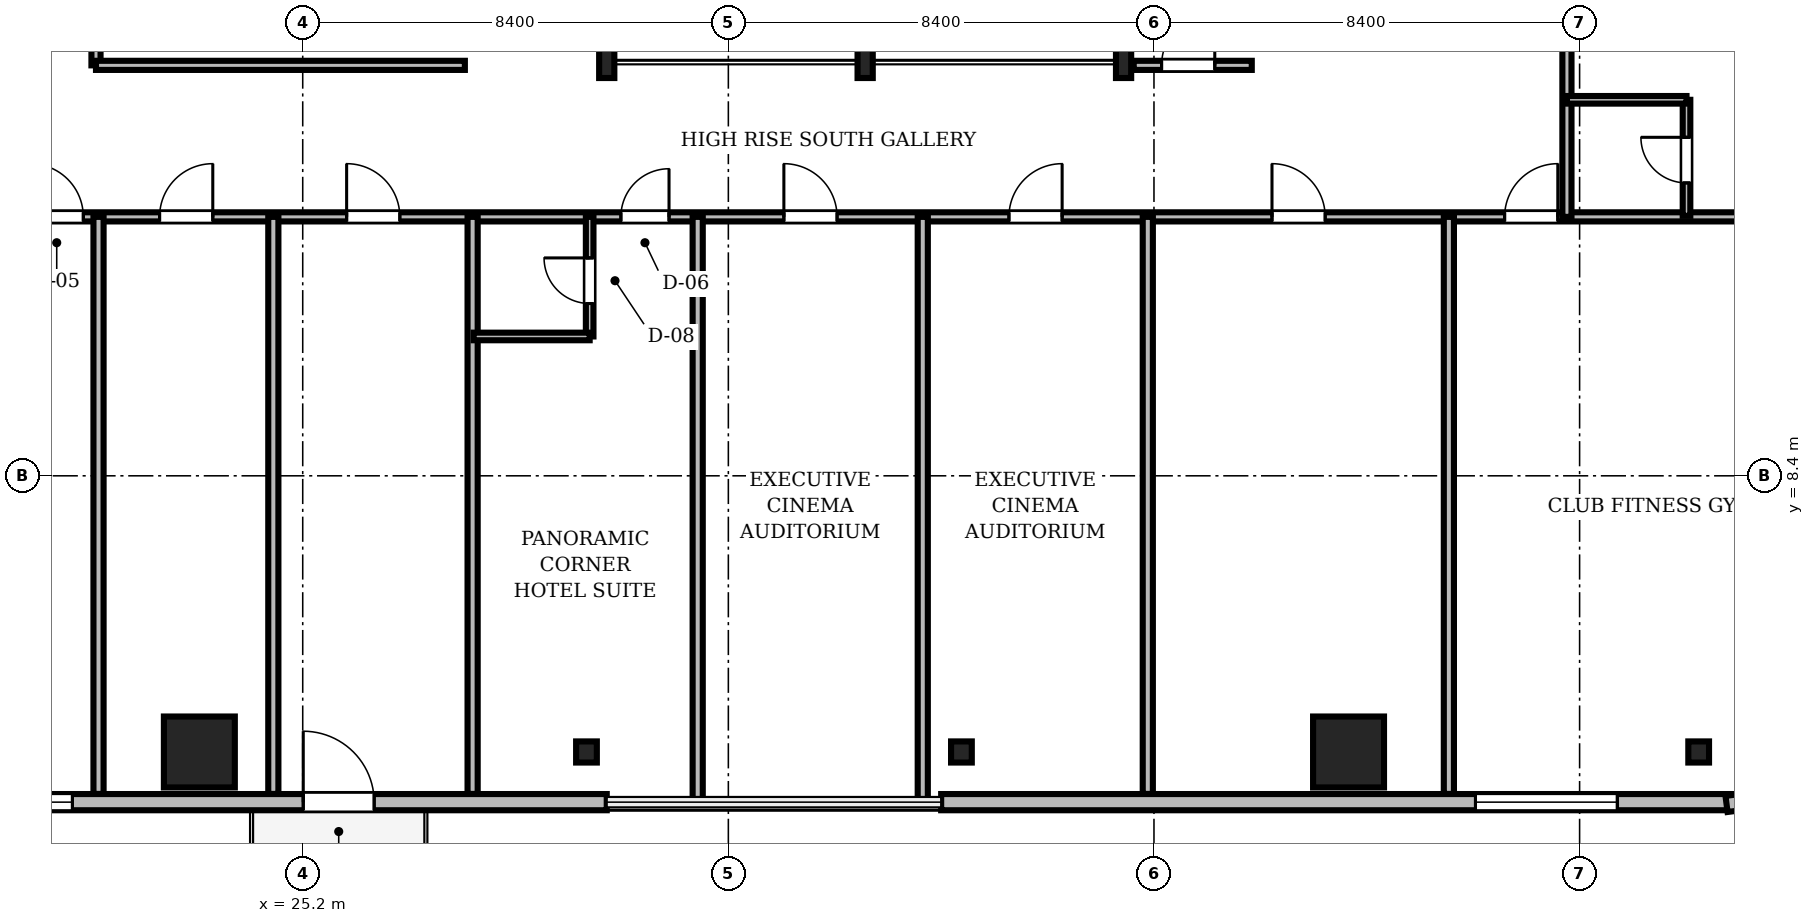
"""IFC4 building model, lengths in metres.
Left out: names, types, materials, properties, quantities, classifications, styles, units other than length and angle.
Written with IfcOpenShell. Run it as: python <this file> out.ifc"""

import sys

from ifc_helpers import new_model, si_unit, direction, frame, frame_2d, origin, origin_2d, place, context, subcontext, project, spatial, rectangle, i_section, extrude, source, transform, mapped, element, fill, save


model = new_model("IFC4")
c1 = context("Model", 3, precision=1e-05, world=origin(), true_north=direction((0.0, 1.0)))
c2 = subcontext(c1, "Body", "Model", "MODEL_VIEW")
j1 = project(units=[si_unit("LENGTHUNIT", "METRE"), si_unit("PLANEANGLEUNIT", "RADIAN")], contexts=[c1])
p1 = place(None, origin())
s1 = spatial("IfcSite", under=j1, at=p1, CompositionType="ELEMENT")
p2 = place(p1, origin())
s2 = spatial("IfcBuilding", under=s1, at=p2, CompositionType="ELEMENT")
p3 = place(p2, frame((0.0, 0.0, 211.05)))
s3 = spatial("IfcBuildingStorey", under=s2, at=p3, CompositionType="ELEMENT", Elevation=211.05)
m1 = source(origin(), c2, "Body", "SweptSolid", [
    extrude(i_section(OverallWidth=0.3, OverallDepth=0.7, WebThickness=0.017, FlangeThickness=0.032, FilletRadius=0.027, at=origin_2d()), origin(), (0.0, 0.0, 1.0), 3.53),
])
for number, where, z_axis, x_axis in (
    (1, (31.2, 16.6, 0.0), (0.0, 0.0, 1.0), (1.0, 0.0, 0.0)),
    (2, (36.3, 16.6, 0.0), (0.0, 0.0, 1.0), (1.0, 0.0, 0.0)),
    (3, (41.4, 16.6, 0.0), (0.0, 0.0, 1.0), (1.0, 0.0, 0.0)),
):
    element("IfcColumn", number, at=place(p3, frame(where, z_axis=z_axis, x_axis=x_axis)), inside=s3, PredefinedType="COLUMN", context=c2, shape_type="MappedRepresentation", body=[
        mapped(m1, transform((0.0, 0.0, 0.0), scale=1.0)),
    ])
m2 = source(origin(), c2, "Body", "SweptSolid", [
    extrude(rectangle(XDim=1.4, YDim=1.4, at=origin_2d()), origin(), (0.0, 0.0, 1.0), 3.53),
])
for number, where, z_axis, x_axis in (
    (4, (23.16, 2.95, 0.0), (0.0, 0.0, 1.0), (1.0, 0.0, 0.0)),
    (5, (45.84, 2.95, 0.0), (0.0, 0.0, 1.0), (1.0, 0.0, 0.0)),
):
    element("IfcColumn", number, at=place(p3, frame(where, z_axis=z_axis, x_axis=x_axis)), inside=s3, PredefinedType="COLUMN", context=c2, shape_type="MappedRepresentation", body=[
        mapped(m2, transform((0.0, 0.0, 0.0), scale=1.0)),
    ])
m3 = source(origin(), c2, "Body", "SweptSolid", [
    extrude(i_section(OverallWidth=0.409, OverallDepth=0.417, WebThickness=0.021, FlangeThickness=0.033, FilletRadius=0.015, at=origin_2d()), origin(), (0.0, 0.0, 1.0), 3.53),
])
for number, where, z_axis, x_axis in (
    (6, (30.8, 2.95, 0.0), (0.0, 0.0, 1.0), (1.0, 0.0, 0.0)),
    (7, (38.2, 2.95, 0.0), (0.0, 0.0, 1.0), (1.0, 0.0, 0.0)),
    (8, (52.75, 2.95, 0.0), (0.0, 0.0, 1.0), (1.0, 0.0, 0.0)),
):
    element("IfcColumn", number, at=place(p3, frame(where, z_axis=z_axis, x_axis=x_axis)), inside=s3, PredefinedType="COLUMN", context=c2, shape_type="MappedRepresentation", body=[
        mapped(m3, transform((0.0, 0.0, 0.0), scale=1.0)),
    ])
m4 = source(origin(), c2, "Body", "SweptSolid", [
    extrude(rectangle(XDim=15.6, YDim=0.32, at=frame_2d((7.8, 0.0))), origin(), (0.0, 0.0, 1.0), 3.53),
])
p4 = place(p3, frame((15.6, 1.96, 0.0), z_axis=(0.0, 0.0, 1.0), x_axis=(1.0, 0.0, 0.0)))
e9 = element("IfcWall", 9, at=p4, inside=s3, PredefinedType="SOLIDWALL", context=c2, shape_type="MappedRepresentation", body=[
    mapped(m4, transform((0.0, 0.0, 0.0), scale=1.0)),
])
m5 = source(origin(), c2, "Body", "SweptSolid", [
    extrude(rectangle(XDim=1.4, YDim=2.3, at=frame_2d((0.7, 1.15))), frame((0.0, 0.17, 0.0), z_axis=(0.0, -1.0, 0.0), x_axis=(1.0, 0.0, 0.0)), (0.0, 0.0, 1.0), 0.34),
])
p5 = place(p4, frame((9.61, 0.0, 0.0)))
e10 = element("IfcOpeningElement", 10, at=p5, cuts=e9, PredefinedType="OPENING", context=c2, shape_type="MappedRepresentation", body=[
    mapped(m5, transform((0.0, 0.0, 0.0), scale=1.0)),
])
m6 = source(origin(), c2, "Body", "SweptSolid", [
    extrude(rectangle(XDim=2.8, YDim=2.4, at=frame_2d((1.4, 1.2))), frame((0.0, 0.17, 0.0), z_axis=(0.0, -1.0, 0.0), x_axis=(1.0, 0.0, 0.0)), (0.0, 0.0, 1.0), 0.34),
])
p6 = place(p4, frame((2.255, 0.0, 0.72)))
e11 = element("IfcOpeningElement", 11, at=p6, cuts=e9, PredefinedType="OPENING", context=c2, shape_type="MappedRepresentation", body=[
    mapped(m6, transform((0.0, 0.0, 0.0), scale=1.0)),
])
p7 = place(p3, frame((37.8, 1.96, 0.0), z_axis=(0.0, 0.0, 1.0), x_axis=(1.0, 0.0, 0.0)))
e12 = element("IfcWall", 12, at=p7, inside=s3, PredefinedType="SOLIDWALL", context=c2, shape_type="MappedRepresentation", body=[
    mapped(m4, transform((0.0, 0.0, 0.0), scale=1.0)),
])
p8 = place(p7, frame((10.545, 0.0, 0.72)))
e13 = element("IfcOpeningElement", 13, at=p8, cuts=e12, PredefinedType="OPENING", context=c2, shape_type="MappedRepresentation", body=[
    mapped(m6, transform((0.0, 0.0, 0.0), scale=1.0)),
])
m7 = source(origin(), c2, "Body", "SweptSolid", [
    extrude(rectangle(XDim=1.17, YDim=0.32, at=frame_2d((0.585, 0.0))), origin(), (0.0, 0.0, 1.0), 3.53),
])
p9 = place(p3, frame((53.3, 1.925, 0.0), z_axis=(0.0, 0.0, 1.0), x_axis=(0.991762485493, 0.128090485085, 0.0)))
e14 = element("IfcWall", 14, at=p9, inside=s3, PredefinedType="SOLIDWALL", context=c2, shape_type="MappedRepresentation", body=[
    mapped(m7, transform((0.0, 0.0, 0.0), scale=1.0)),
])
m8 = source(origin(), c2, "Body", "SweptSolid", [
    extrude(rectangle(XDim=46.156, YDim=0.18, at=frame_2d((23.078, 0.0))), origin(), (0.0, 0.0, 1.0), 2.772),
])
p10 = place(p3, frame((11.422, 13.51, 0.0), z_axis=(0.0, 0.0, 1.0), x_axis=(1.0, 0.0, 0.0)))
e15 = element("IfcWall", 15, at=p10, inside=s3, PredefinedType="PARTITIONING", context=c2, shape_type="MappedRepresentation", body=[
    mapped(m8, transform((0.0, 0.0, 0.0), scale=1.0)),
])
m9 = source(origin(), c2, "Body", "SweptSolid", [
    extrude(rectangle(XDim=1.05, YDim=2.2, at=frame_2d((0.525, 1.1))), frame((0.0, 0.1, 0.0), z_axis=(0.0, -1.0, 0.0), x_axis=(1.0, 0.0, 0.0)), (0.0, 0.0, 1.0), 0.2),
])
p11 = place(p10, frame((8.398, 0.0, 0.0)))
e16 = element("IfcOpeningElement", 16, at=p11, cuts=e15, PredefinedType="OPENING", context=c2, shape_type="MappedRepresentation", body=[
    mapped(m9, transform((0.0, 0.0, 0.0), scale=1.0)),
])
p12 = place(p10, frame((10.953, 0.0, 0.0)))
e17 = element("IfcOpeningElement", 17, at=p12, cuts=e15, PredefinedType="OPENING", context=c2, shape_type="MappedRepresentation", body=[
    mapped(m9, transform((0.0, 0.0, 0.0), scale=1.0)),
])
p13 = place(p10, frame((14.645, 0.0, 0.0)))
e18 = element("IfcOpeningElement", 18, at=p13, cuts=e15, PredefinedType="OPENING", context=c2, shape_type="MappedRepresentation", body=[
    mapped(m9, transform((0.0, 0.0, 0.0), scale=1.0)),
])
m10 = source(origin(), c2, "Body", "SweptSolid", [
    extrude(rectangle(XDim=0.95, YDim=2.15, at=frame_2d((0.475, 1.075))), frame((0.0, 0.1, 0.0), z_axis=(0.0, -1.0, 0.0), x_axis=(1.0, 0.0, 0.0)), (0.0, 0.0, 1.0), 0.2),
])
p14 = place(p10, frame((20.057, 0.0, 0.0)))
e19 = element("IfcOpeningElement", 19, at=p14, cuts=e15, PredefinedType="OPENING", context=c2, shape_type="MappedRepresentation", body=[
    mapped(m10, transform((0.0, 0.0, 0.0), scale=1.0)),
])
p15 = place(p10, frame((23.274, 0.0, 0.0)))
e20 = element("IfcOpeningElement", 20, at=p15, cuts=e15, PredefinedType="OPENING", context=c2, shape_type="MappedRepresentation", body=[
    mapped(m9, transform((0.0, 0.0, 0.0), scale=1.0)),
])
p16 = place(p10, frame((27.716, 0.0, 0.0)))
e21 = element("IfcOpeningElement", 21, at=p16, cuts=e15, PredefinedType="OPENING", context=c2, shape_type="MappedRepresentation", body=[
    mapped(m9, transform((0.0, 0.0, 0.0), scale=1.0)),
])
p17 = place(p10, frame((32.907, 0.0, 0.0)))
e22 = element("IfcOpeningElement", 22, at=p17, cuts=e15, PredefinedType="OPENING", context=c2, shape_type="MappedRepresentation", body=[
    mapped(m9, transform((0.0, 0.0, 0.0), scale=1.0)),
])
p18 = place(p10, frame((37.498, 0.0, 0.0)))
e23 = element("IfcOpeningElement", 23, at=p18, cuts=e15, PredefinedType="OPENING", context=c2, shape_type="MappedRepresentation", body=[
    mapped(m9, transform((0.0, 0.0, 0.0), scale=1.0)),
])
m11 = source(origin(), c2, "Body", "SweptSolid", [
    extrude(rectangle(XDim=27.59, YDim=0.18, at=frame_2d((13.795, 0.0))), origin(), (0.0, 0.0, 1.0), 2.972),
])
p19 = place(p3, frame((50.15, 13.51, 0.0), z_axis=(0.0, 0.0, 1.0), x_axis=(0.0, 1.0, 0.0)))
e24 = element("IfcWall", 24, at=p19, inside=s3, PredefinedType="PARTITIONING", context=c2, shape_type="MappedRepresentation", body=[
    mapped(m11, transform((0.0, 0.0, 0.0), scale=1.0)),
])
p20 = place(p19, frame((4.086, 0.0, 0.0)))
e25 = element("IfcOpeningElement", 25, at=p20, cuts=e24, PredefinedType="OPENING", context=c2, shape_type="MappedRepresentation", body=[
    mapped(m9, transform((0.0, 0.0, 0.0), scale=1.0)),
])
p21 = place(p19, frame((9.744, 0.0, 0.0)))
e26 = element("IfcOpeningElement", 26, at=p21, cuts=e24, PredefinedType="OPENING", context=c2, shape_type="MappedRepresentation", body=[
    mapped(m9, transform((0.0, 0.0, 0.0), scale=1.0)),
])
p22 = place(p19, frame((17.771, 0.0, 0.0)))
e27 = element("IfcOpeningElement", 27, at=p22, cuts=e24, PredefinedType="OPENING", context=c2, shape_type="MappedRepresentation", body=[
    mapped(m9, transform((0.0, 0.0, 0.0), scale=1.0)),
])
p23 = place(p19, frame((24.614, 0.0, 0.0)))
e28 = element("IfcOpeningElement", 28, at=p23, cuts=e24, PredefinedType="OPENING", context=c2, shape_type="MappedRepresentation", body=[
    mapped(m9, transform((0.0, 0.0, 0.0), scale=1.0)),
])
m12 = source(origin(), c2, "Body", "SweptSolid", [
    extrude(rectangle(XDim=11.94, YDim=0.18, at=frame_2d((5.97, 0.0))), origin(), (0.0, 0.0, 1.0), 2.972),
])
p24 = place(p3, frame((21.12, 16.5, 0.0), z_axis=(0.0, 0.0, 1.0), x_axis=(0.0, 1.0, 0.0)))
e29 = element("IfcWall", 29, at=p24, inside=s3, PredefinedType="PARTITIONING", context=c2, shape_type="MappedRepresentation", body=[
    mapped(m12, transform((0.0, 0.0, 0.0), scale=1.0)),
])
p25 = place(p24, frame((4.5, 0.0, 0.0)))
e30 = element("IfcOpeningElement", 30, at=p25, cuts=e29, PredefinedType="OPENING", context=c2, shape_type="MappedRepresentation", body=[
    mapped(m9, transform((0.0, 0.0, 0.0), scale=1.0)),
])
m13 = source(origin(), c2, "Body", "SweptSolid", [
    extrude(rectangle(XDim=2.36, YDim=0.15, at=frame_2d((1.18, 0.0))), origin(), (0.0, 0.0, 1.0), 2.972),
])
p26 = place(p3, frame((30.863, 11.15, 0.0), z_axis=(0.0, 0.0, 1.0), x_axis=(0.0, 1.0, 0.0)))
e31 = element("IfcWall", 31, at=p26, inside=s3, PredefinedType="PARTITIONING", context=c2, shape_type="MappedRepresentation", body=[
    mapped(m13, transform((0.0, 0.0, 0.0), scale=1.0)),
])
m14 = source(origin(), c2, "Body", "SweptSolid", [
    extrude(rectangle(XDim=0.9, YDim=2.1, at=frame_2d((0.45, 1.05))), frame((0.0, 0.085, 0.0), z_axis=(0.0, -1.0, 0.0), x_axis=(1.0, 0.0, 0.0)), (0.0, 0.0, 1.0), 0.17),
])
p27 = place(p26, frame((0.65, 0.0, 0.0)))
e32 = element("IfcOpeningElement", 32, at=p27, cuts=e31, PredefinedType="OPENING", context=c2, shape_type="MappedRepresentation", body=[
    mapped(m14, transform((0.0, 0.0, 0.0), scale=1.0)),
])
m15 = source(origin(), c2, "Body", "SweptSolid", [
    extrude(rectangle(XDim=2.33, YDim=0.18, at=frame_2d((1.165, 0.0))), origin(), (0.0, 0.0, 1.0), 2.972),
])
p28 = place(p3, frame((41.6, 16.5, 0.0), z_axis=(0.0, 0.0, 1.0), x_axis=(1.0, 0.0, 0.0)))
e33 = element("IfcWall", 33, at=p28, inside=s3, PredefinedType="PARTITIONING", context=c2, shape_type="MappedRepresentation", body=[
    mapped(m15, transform((0.0, 0.0, 0.0), scale=1.0)),
])
p29 = place(p28, frame((0.55, 0.0, 0.0)))
e34 = element("IfcOpeningElement", 34, at=p29, cuts=e33, PredefinedType="OPENING", context=c2, shape_type="MappedRepresentation", body=[
    mapped(m9, transform((0.0, 0.0, 0.0), scale=1.0)),
])
m16 = source(origin(), c2, "Body", "SweptSolid", [
    extrude(rectangle(XDim=2.29, YDim=0.15, at=frame_2d((1.145, 0.0))), origin(), (0.0, 0.0, 1.0), 2.972),
])
p30 = place(p3, frame((52.51, 13.53, 0.0), z_axis=(0.0, 0.0, 1.0), x_axis=(0.0, 1.0, 0.0)))
e35 = element("IfcWall", 35, at=p30, inside=s3, PredefinedType="PARTITIONING", context=c2, shape_type="MappedRepresentation", body=[
    mapped(m16, transform((0.0, 0.0, 0.0), scale=1.0)),
])
p31 = place(p30, frame((0.65, 0.0, 0.0)))
e36 = element("IfcOpeningElement", 36, at=p31, cuts=e35, PredefinedType="OPENING", context=c2, shape_type="MappedRepresentation", body=[
    mapped(m14, transform((0.0, 0.0, 0.0), scale=1.0)),
])
m17 = source(origin(), c2, "Body", "SweptSolid", [
    extrude(rectangle(XDim=11.388, YDim=0.2, at=frame_2d((5.694, 0.0))), origin(), (0.0, 0.0, 1.0), 2.772),
])
for number, where, z_axis, x_axis in (
    (37, (21.17, 2.122, 0.0), (0.0, 0.0, 1.0), (0.0, 1.0, 0.0)),
    (38, (24.62, 2.122, 0.0), (0.0, 0.0, 1.0), (0.0, 1.0, 0.0)),
    (39, (28.553, 2.122, 0.0), (0.0, 0.0, 1.0), (0.0, 1.0, 0.0)),
):
    element("IfcWall", number, at=place(p3, frame(where, z_axis=z_axis, x_axis=x_axis)), inside=s3, PredefinedType="PARTITIONING", context=c2, shape_type="MappedRepresentation", body=[
        mapped(m17, transform((0.0, 0.0, 0.0), scale=1.0)),
    ])
m18 = source(origin(), c2, "Body", "SweptSolid", [
    extrude(rectangle(XDim=11.58, YDim=0.2, at=frame_2d((5.79, 0.0))), origin(), (0.0, 0.0, 1.0), 2.772),
])
for number, where, z_axis, x_axis in (
    (40, (32.995, 1.93, 0.0), (0.0, 0.0, 1.0), (0.0, 1.0, 0.0)),
    (41, (37.437, 1.93, 0.0), (0.0, 0.0, 1.0), (0.0, 1.0, 0.0)),
):
    element("IfcWall", number, at=place(p3, frame(where, z_axis=z_axis, x_axis=x_axis)), inside=s3, PredefinedType="PARTITIONING", context=c2, shape_type="MappedRepresentation", body=[
        mapped(m18, transform((0.0, 0.0, 0.0), scale=1.0)),
    ])
for number, where, z_axis, x_axis in (
    (42, (41.878, 2.122, 0.0), (0.0, 0.0, 1.0), (0.0, 1.0, 0.0)),
    (43, (47.82, 2.122, 0.0), (0.0, 0.0, 1.0), (0.0, 1.0, 0.0)),
):
    element("IfcWall", number, at=place(p3, frame(where, z_axis=z_axis, x_axis=x_axis)), inside=s3, PredefinedType="PARTITIONING", context=c2, shape_type="MappedRepresentation", body=[
        mapped(m17, transform((0.0, 0.0, 0.0), scale=1.0)),
    ])
m19 = source(origin(), c2, "Body", "SweptSolid", [
    extrude(rectangle(XDim=7.28, YDim=0.18, at=frame_2d((3.64, 0.0))), origin(), (0.0, 0.0, 1.0), 3.53),
])
p32 = place(p3, frame((21.12, 16.5, 0.0), z_axis=(0.0, 0.0, 1.0), x_axis=(1.0, 0.0, 0.0)))
e44 = element("IfcWall", 44, at=p32, inside=s3, PredefinedType="PARTITIONING", context=c2, shape_type="MappedRepresentation", body=[
    mapped(m19, transform((0.0, 0.0, 0.0), scale=1.0)),
])
m20 = source(origin(), c2, "Body", "SweptSolid", [
    extrude(rectangle(XDim=2.36, YDim=0.15, at=frame_2d((1.18, 0.0))), origin(), (0.0, 0.0, 1.0), 3.53),
])
p33 = place(p3, frame((50.15, 15.82, 0.0), z_axis=(0.0, 0.0, 1.0), x_axis=(1.0, 0.0, 0.0)))
e45 = element("IfcWall", 45, at=p33, inside=s3, PredefinedType="PARTITIONING", context=c2, shape_type="MappedRepresentation", body=[
    mapped(m20, transform((0.0, 0.0, 0.0), scale=1.0)),
])
m21 = source(origin(), c2, "Body", "SweptSolid", [
    extrude(rectangle(XDim=2.29, YDim=0.15, at=frame_2d((1.145, 0.0))), origin(), (0.0, 0.0, 1.0), 3.53),
])
p34 = place(p3, frame((28.573, 11.15, 0.0), z_axis=(0.0, 0.0, 1.0), x_axis=(1.0, 0.0, 0.0)))
e46 = element("IfcWall", 46, at=p34, inside=s3, PredefinedType="PARTITIONING", context=c2, shape_type="MappedRepresentation", body=[
    mapped(m21, transform((0.0, 0.0, 0.0), scale=1.0)),
])
m22 = source(origin(), c2, "Body", "SweptSolid", [
    extrude(rectangle(XDim=1.4, YDim=2.3, at=frame_2d((0.7, 1.15))), frame((0.0, 0.025, 0.0), z_axis=(0.0, -1.0, 0.0), x_axis=(1.0, 0.0, 0.0)), (0.0, 0.0, 1.0), 0.05),
])
p35 = place(p5, frame((1.4, 0.0, 0.0), z_axis=(0.0, 0.0, 1.0), x_axis=(-1.0, 0.0, 0.0)))
e47 = element("IfcDoor", 47, at=p35, inside=s3, OperationType="DOUBLE_DOOR_SLIDING", PredefinedType="DOOR", context=c2, shape_type="MappedRepresentation", body=[
    mapped(m22, transform((0.0, 0.0, 0.0), scale=1.0)),
])
fill(e10, e47)
m23 = source(origin(), c2, "Body", "SweptSolid", [
    extrude(rectangle(XDim=2.8, YDim=2.4, at=frame_2d((1.4, 1.2))), frame((0.0, 0.03, 0.0), z_axis=(0.0, -1.0, 0.0), x_axis=(1.0, 0.0, 0.0)), (0.0, 0.0, 1.0), 0.06),
])
p36 = place(p6, origin())
e48 = element("IfcWindow", 48, at=p36, inside=s3, PartitioningType="SINGLE_PANEL", PredefinedType="WINDOW", context=c2, shape_type="MappedRepresentation", body=[
    mapped(m23, transform((0.0, 0.0, 0.0), scale=1.0)),
])
fill(e11, e48)
p37 = place(p8, origin())
e49 = element("IfcWindow", 49, at=p37, inside=s3, PartitioningType="SINGLE_PANEL", PredefinedType="WINDOW", context=c2, shape_type="MappedRepresentation", body=[
    mapped(m23, transform((0.0, 0.0, 0.0), scale=1.0)),
])
fill(e13, e49)
m24 = source(origin(), c2, "Body", "SweptSolid", [
    extrude(rectangle(XDim=1.05, YDim=2.2, at=frame_2d((0.525, 1.1))), frame((0.0, 0.025, 0.0), z_axis=(0.0, -1.0, 0.0), x_axis=(1.0, 0.0, 0.0)), (0.0, 0.0, 1.0), 0.05),
])
p38 = place(p11, origin())
e50 = element("IfcDoor", 50, at=p38, inside=s3, OperationType="SINGLE_SWING_LEFT", PredefinedType="DOOR", context=c2, shape_type="MappedRepresentation", body=[
    mapped(m24, transform((0.0, 0.0, 0.0), scale=1.0)),
])
fill(e16, e50)
p39 = place(p12, origin())
e51 = element("IfcDoor", 51, at=p39, inside=s3, OperationType="SINGLE_SWING_RIGHT", PredefinedType="DOOR", context=c2, shape_type="MappedRepresentation", body=[
    mapped(m24, transform((0.0, 0.0, 0.0), scale=1.0)),
])
fill(e17, e51)
p40 = place(p13, origin())
e52 = element("IfcDoor", 52, at=p40, inside=s3, OperationType="SINGLE_SWING_LEFT", PredefinedType="DOOR", context=c2, shape_type="MappedRepresentation", body=[
    mapped(m24, transform((0.0, 0.0, 0.0), scale=1.0)),
])
fill(e18, e52)
m25 = source(origin(), c2, "Body", "SweptSolid", [
    extrude(rectangle(XDim=0.95, YDim=2.15, at=frame_2d((0.475, 1.075))), frame((0.0, 0.025, 0.0), z_axis=(0.0, -1.0, 0.0), x_axis=(1.0, 0.0, 0.0)), (0.0, 0.0, 1.0), 0.05),
])
p41 = place(p14, origin())
e53 = element("IfcDoor", 53, at=p41, inside=s3, OperationType="SINGLE_SWING_RIGHT", PredefinedType="DOOR", context=c2, shape_type="MappedRepresentation", body=[
    mapped(m25, transform((0.0, 0.0, 0.0), scale=1.0)),
])
fill(e19, e53)
p42 = place(p15, origin())
e54 = element("IfcDoor", 54, at=p42, inside=s3, OperationType="SINGLE_SWING_LEFT", PredefinedType="DOOR", context=c2, shape_type="MappedRepresentation", body=[
    mapped(m24, transform((0.0, 0.0, 0.0), scale=1.0)),
])
fill(e20, e54)
p43 = place(p16, origin())
e55 = element("IfcDoor", 55, at=p43, inside=s3, OperationType="SINGLE_SWING_RIGHT", PredefinedType="DOOR", context=c2, shape_type="MappedRepresentation", body=[
    mapped(m24, transform((0.0, 0.0, 0.0), scale=1.0)),
])
fill(e21, e55)
p44 = place(p17, origin())
e56 = element("IfcDoor", 56, at=p44, inside=s3, OperationType="SINGLE_SWING_LEFT", PredefinedType="DOOR", context=c2, shape_type="MappedRepresentation", body=[
    mapped(m24, transform((0.0, 0.0, 0.0), scale=1.0)),
])
fill(e22, e56)
p45 = place(p18, origin())
e57 = element("IfcDoor", 57, at=p45, inside=s3, OperationType="SINGLE_SWING_RIGHT", PredefinedType="DOOR", context=c2, shape_type="MappedRepresentation", body=[
    mapped(m24, transform((0.0, 0.0, 0.0), scale=1.0)),
])
fill(e23, e57)
m26 = source(origin(), c2, "Body", "SweptSolid", [
    extrude(rectangle(XDim=0.9, YDim=2.1, at=frame_2d((0.45, 1.05))), frame((0.0, 0.025, 0.0), z_axis=(0.0, -1.0, 0.0), x_axis=(1.0, 0.0, 0.0)), (0.0, 0.0, 1.0), 0.05),
])
p46 = place(p27, origin())
e58 = element("IfcDoor", 58, at=p46, inside=s3, OperationType="SINGLE_SWING_RIGHT", PredefinedType="DOOR", context=c2, shape_type="MappedRepresentation", body=[
    mapped(m26, transform((0.0, 0.0, 0.0), scale=1.0)),
])
fill(e32, e58)
p47 = place(p29, origin())
e59 = element("IfcDoor", 59, at=p47, inside=s3, OperationType="SINGLE_SWING_RIGHT", PredefinedType="DOOR", context=c2, shape_type="MappedRepresentation", body=[
    mapped(m24, transform((0.0, 0.0, 0.0), scale=1.0)),
])
fill(e34, e59)
p48 = place(p31, origin())
e60 = element("IfcDoor", 60, at=p48, inside=s3, OperationType="SINGLE_SWING_RIGHT", PredefinedType="DOOR", context=c2, shape_type="MappedRepresentation", body=[
    mapped(m26, transform((0.0, 0.0, 0.0), scale=1.0)),
])
fill(e36, e60)
save(model, sys.argv[1])
